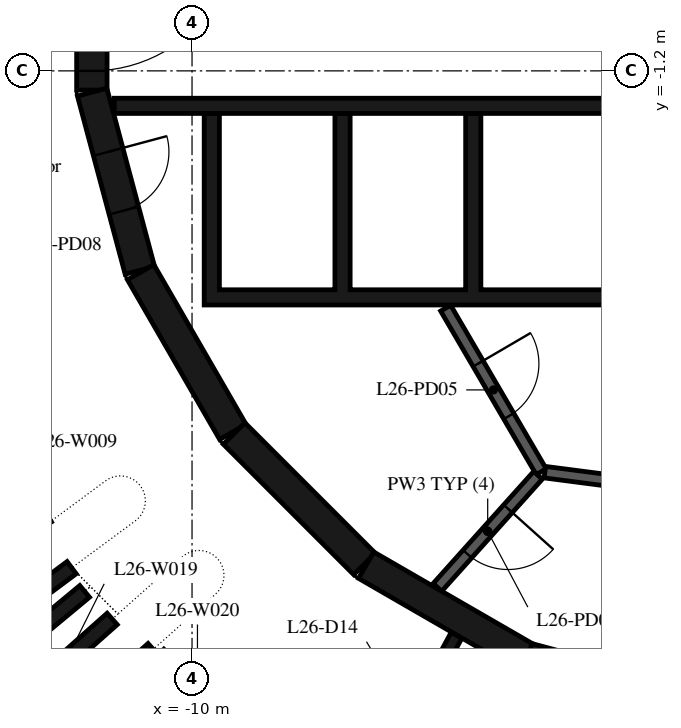
"""IFC4 building model, lengths in metres.
Left out: names, types, materials, properties, quantities, classifications, styles, units other than length and angle.
Written with IfcOpenShell. Run it as: python <this file> out.ifc"""

import sys

from ifc_helpers import new_model, si_unit, direction, frame, frame_2d, origin, place, context, subcontext, project, spatial, polyline, rectangle, outline, extrude, element, fill, save


model = new_model("IFC4")
c1 = context("Model", 3, precision=1e-05, world=origin(), true_north=direction((0.0, 1.0)))
c2 = subcontext(c1, "Body", "Model", "MODEL_VIEW")
j1 = project(units=[si_unit("LENGTHUNIT", "METRE"), si_unit("PLANEANGLEUNIT", "RADIAN")], contexts=[c1])
p1 = place(None, origin())
s1 = spatial("IfcSite", under=j1, at=p1, CompositionType="ELEMENT")
p2 = place(p1, origin())
s2 = spatial("IfcBuilding", under=s1, at=p2, CompositionType="ELEMENT")
p3 = place(p2, frame((0.0, 0.0, 108.2)))
s3 = spatial("IfcBuildingStorey", under=s2, at=p3, CompositionType="ELEMENT", Elevation=108.2)
p4 = place(p3, frame((-11.647, 1.516, 0.0), z_axis=(0.0, 0.0, 1.0), x_axis=(0.0, -1.0, 0.0)))
e1 = element("IfcWall", 1, at=p4, inside=s3, PredefinedType="SHEAR", context=c2, shape_type="SweptSolid", body=[
    extrude(rectangle(XDim=3.033, YDim=0.5, at=frame_2d((1.516, 0.0))), origin(), (0.0, 0.0, 1.0), 4.75),
])
p5 = place(p4, frame((0.316, 0.0, 0.0)))
e2 = element("IfcOpeningElement", 2, at=p5, cuts=e1, PredefinedType="OPENING", context=c2, shape_type="SweptSolid", body=[
    extrude(rectangle(XDim=2.4, YDim=2.1, at=frame_2d((1.2, 1.05))), frame((0.0, 0.26, 0.0), z_axis=(0.0, -1.0, 0.0), x_axis=(1.0, 0.0, 0.0)), (0.0, 0.0, 1.0), 0.52),
])
p6 = place(p3, frame((-11.643, -1.55, 0.0), z_axis=(0.0, 0.0, 1.0), x_axis=(0.258734743916, -0.965948410781, 0.0)))
e3 = element("IfcWall", 3, at=p6, inside=s3, PredefinedType="SHEAR", context=c2, shape_type="SweptSolid", body=[
    extrude(rectangle(XDim=3.033, YDim=0.5, at=frame_2d((1.516, 0.0))), origin(), (0.0, 0.0, 1.0), 4.75),
])
p7 = place(p6, frame((1.016, 0.0, 0.0)))
e4 = element("IfcOpeningElement", 4, at=p7, cuts=e3, PredefinedType="OPENING", context=c2, shape_type="SweptSolid", body=[
    extrude(rectangle(XDim=1.0, YDim=2.4, at=frame_2d((0.5, 1.2))), frame((0.0, 0.26, 0.0), z_axis=(0.0, -1.0, 0.0), x_axis=(1.0, 0.0, 0.0)), (0.0, 0.0, 1.0), 0.52),
])
p8 = place(p3, frame((-10.845, -4.51, 0.0), z_axis=(0.0, 0.0, 1.0), x_axis=(0.500087131594, -0.865975092491, 0.0)))
e5 = element("IfcWall", 5, at=p8, inside=s3, PredefinedType="SHEAR", context=c2, shape_type="SweptSolid", body=[
    extrude(rectangle(XDim=3.033, YDim=0.5, at=frame_2d((1.516, 0.0))), origin(), (0.0, 0.0, 1.0), 4.75),
])
p9 = place(p3, frame((-9.308, -7.164, 0.0), z_axis=(0.0, 0.0, 1.0), x_axis=(0.707106781187, -0.707106781187, 0.0)))
e6 = element("IfcWall", 6, at=p9, inside=s3, PredefinedType="SHEAR", context=c2, shape_type="SweptSolid", body=[
    extrude(rectangle(XDim=3.032, YDim=0.5, at=frame_2d((1.516, 0.0))), origin(), (0.0, 0.0, 1.0), 4.75),
])
for number, where, z_axis, x_axis in (
    (7, (-7.137, -9.329, 0.0), (0.0, 0.0, 1.0), (0.866, -0.5, 0.0)),
    (8, (-4.479, -10.858, 0.0), (0.0, 0.0, 1.0), (0.966, -0.259, 0.0)),
):
    element("IfcWall", number, at=place(p3, frame(where, z_axis=z_axis, x_axis=x_axis)), inside=s3, PredefinedType="SHEAR", context=c2, shape_type="SweptSolid", body=[
        extrude(rectangle(XDim=3.033, YDim=0.5, at=frame_2d((1.516, 0.0))), origin(), (0.0, 0.0, 1.0), 4.75),
    ])
p10 = place(p3, origin())
e9 = element("IfcWall", 9, at=p10, inside=s3, PredefinedType="SHEAR", context=c2, shape_type="SweptSolid", body=[
    extrude(outline(polyline([(9.8, -5.05), (9.8, -4.8), (9.8, -1.9), (9.55, -1.9), (9.55, -4.8), (7.65, -4.8), (7.65, -1.9), (7.4, -1.9), (7.4, -4.8), (5.5, -4.8), (5.5, -1.9), (5.25, -1.9), (5.25, -4.8), (3.35, -4.8), (3.35, -1.9), (3.1, -1.9), (3.1, -4.8), (-5.25, -4.8), (-5.25, -1.9), (-5.5, -1.9), (-5.5, -4.8), (-7.4, -4.8), (-7.4, -1.9), (-7.65, -1.9), (-7.65, -4.8), (-9.55, -4.8), (-9.55, -1.9), (-9.8, -1.9), (-9.8, -4.8), (-9.8, -5.05), (9.8, -5.05)])), origin(), (0.0, 0.0, 1.0), 4.75),
])
p11 = place(p3, frame((-11.28, -1.775, 0.0), z_axis=(0.0, 0.0, 1.0), x_axis=(1.0, 0.0, 0.0)))
e10 = element("IfcWall", 10, at=p11, inside=s3, PredefinedType="SHEAR", context=c2, shape_type="SweptSolid", body=[
    extrude(rectangle(XDim=14.38, YDim=0.25, at=frame_2d((7.19, 0.0))), origin(), (0.0, 0.0, 1.0), 4.75),
])
p12 = place(p11, frame((9.705, 0.0, 0.0)))
e11 = element("IfcOpeningElement", 11, at=p12, cuts=e10, PredefinedType="OPENING", context=c2, shape_type="SweptSolid", body=[
    extrude(rectangle(XDim=1.0, YDim=2.4, at=frame_2d((0.5, 1.2))), frame((0.0, 0.135, 0.0), z_axis=(0.0, -1.0, 0.0), x_axis=(1.0, 0.0, 0.0)), (0.0, 0.0, 1.0), 0.27),
])
p13 = place(p3, frame((-5.829, -5.102, 0.0), z_axis=(0.0, 0.0, 1.0), x_axis=(0.504480008384, -0.863423373057, 0.0)))
e12 = element("IfcWall", 12, at=p13, inside=s3, PredefinedType="PARTITIONING", context=c2, shape_type="SweptSolid", body=[
    extrude(rectangle(XDim=3.115, YDim=0.19, at=frame_2d((1.558, 0.0))), origin(), (0.0, 0.0, 1.0), 4.75),
])
p14 = place(p13, frame((1.058, 0.0, 0.0)))
e13 = element("IfcOpeningElement", 13, at=p14, cuts=e12, PredefinedType="OPENING", context=c2, shape_type="SweptSolid", body=[
    extrude(rectangle(XDim=1.0, YDim=2.4, at=frame_2d((0.5, 1.2))), frame((0.0, 0.105, 0.0), z_axis=(0.0, -1.0, 0.0), x_axis=(1.0, 0.0, 0.0)), (0.0, 0.0, 1.0), 0.21),
])
p15 = place(p3, frame((-4.311, -7.851, 0.0), z_axis=(0.0, 0.0, 1.0), x_axis=(-0.667869133096, -0.744278725383, 0.0)))
e14 = element("IfcWall", 14, at=p15, inside=s3, PredefinedType="PARTITIONING", context=c2, shape_type="SweptSolid", body=[
    extrude(rectangle(XDim=2.476, YDim=0.19, at=frame_2d((1.238, 0.0))), origin(), (0.0, 0.0, 1.0), 4.75),
])
p16 = place(p15, frame((0.738, 0.0, 0.0)))
e15 = element("IfcOpeningElement", 15, at=p16, cuts=e14, PredefinedType="OPENING", context=c2, shape_type="SweptSolid", body=[
    extrude(rectangle(XDim=1.0, YDim=2.4, at=frame_2d((0.5, 1.2))), frame((0.0, 0.105, 0.0), z_axis=(0.0, -1.0, 0.0), x_axis=(1.0, 0.0, 0.0)), (0.0, 0.0, 1.0), 0.21),
])
p17 = place(p3, frame((-4.198, -7.799, 0.0), z_axis=(0.0, 0.0, 1.0), x_axis=(0.991686747293, -0.128675542523, 0.0)))
e16 = element("IfcWall", 16, at=p17, inside=s3, PredefinedType="PARTITIONING", context=c2, shape_type="SweptSolid", body=[
    extrude(rectangle(XDim=1.793, YDim=0.19, at=frame_2d((0.896, 0.0))), origin(), (0.0, 0.0, 1.0), 4.75),
])
p18 = place(p3, frame((-13.98, -10.86, 0.0), z_axis=(0.0, 0.0, 1.0), x_axis=(0.80192236943, 0.597428249589, 0.0)))
e17 = element("IfcWall", 17, at=p18, inside=s3, PredefinedType="PARTITIONING", context=c2, shape_type="SweptSolid", body=[
    extrude(rectangle(XDim=2.494, YDim=0.25, at=frame_2d((1.247, 0.0))), origin(), (0.0, 0.0, 1.0), 4.75),
])
p19 = place(p3, frame((-12.28, -12.17, 0.0), z_axis=(0.0, 0.0, 1.0), x_axis=(0.746942923143, 0.664888163202, 0.0)))
e18 = element("IfcWall", 18, at=p19, inside=s3, PredefinedType="PARTITIONING", context=c2, shape_type="SweptSolid", body=[
    extrude(rectangle(XDim=2.196, YDim=0.25, at=frame_2d((1.098, 0.0))), origin(), (0.0, 0.0, 1.0), 4.75),
])
p20 = place(p3, frame((-11.766, -9.76, 0.0), z_axis=(0.0, 0.0, 1.0), x_axis=(-0.769226522348, -0.63897617899, 0.0)))
e19 = element("IfcWall", 19, at=p20, inside=s3, PredefinedType="PARTITIONING", context=c2, shape_type="SweptSolid", body=[
    extrude(rectangle(XDim=6.026, YDim=0.25, at=frame_2d((3.013, 0.0))), origin(), (0.0, 0.0, 1.0), 4.75),
])
p21 = place(p3, frame((-11.313, -10.213, 0.0), z_axis=(0.0, 0.0, 1.0), x_axis=(-0.747910613197, -0.663799453651, 0.0)))
e20 = element("IfcWall", 20, at=p21, inside=s3, PredefinedType="PARTITIONING", context=c2, shape_type="SweptSolid", body=[
    extrude(rectangle(XDim=2.014, YDim=0.25, at=frame_2d((1.007, 0.0))), origin(), (0.0, 0.0, 1.0), 4.75),
])
p22 = place(p3, frame((-7.109, -13.186, 0.0), z_axis=(0.0, 0.0, 1.0), x_axis=(0.474511788195, 0.880249148176, 0.0)))
e21 = element("IfcWall", 21, at=p22, inside=s3, PredefinedType="PARTITIONING", context=c2, shape_type="SweptSolid", body=[
    extrude(rectangle(XDim=3.074, YDim=0.2, at=frame_2d((1.537, 0.0))), origin(), (0.0, 0.0, 1.0), 4.75),
])
p23 = place(p22, frame((0.937, 0.0, 0.0)))
e22 = element("IfcOpeningElement", 22, at=p23, cuts=e21, PredefinedType="OPENING", context=c2, shape_type="SweptSolid", body=[
    extrude(rectangle(XDim=1.2, YDim=2.1, at=frame_2d((0.6, 1.05))), frame((0.0, 0.11, 0.0), z_axis=(0.0, -1.0, 0.0), x_axis=(1.0, 0.0, 0.0)), (0.0, 0.0, 1.0), 0.22),
])
p24 = place(p5, origin())
e23 = element("IfcDoor", 23, at=p24, inside=s3, OperationType="DOUBLE_DOOR_SINGLE_SWING", PredefinedType="DOOR", context=c2, shape_type="SweptSolid", body=[
    extrude(rectangle(XDim=2.4, YDim=2.1, at=frame_2d((1.2, 1.05))), frame((0.0, 0.025, 0.0), z_axis=(0.0, -1.0, 0.0), x_axis=(1.0, 0.0, 0.0)), (0.0, 0.0, 1.0), 0.05),
])
fill(e2, e23)
p25 = place(p16, origin())
e24 = element("IfcDoor", 24, at=p25, inside=s3, OperationType="SINGLE_SWING_LEFT", PredefinedType="DOOR", context=c2, shape_type="SweptSolid", body=[
    extrude(rectangle(XDim=1.0, YDim=2.4, at=frame_2d((0.5, 1.2))), frame((0.0, 0.025, 0.0), z_axis=(0.0, -1.0, 0.0), x_axis=(1.0, 0.0, 0.0)), (0.0, 0.0, 1.0), 0.05),
])
fill(e15, e24)
p26 = place(p14, origin())
e25 = element("IfcDoor", 25, at=p26, inside=s3, OperationType="SINGLE_SWING_RIGHT", PredefinedType="DOOR", context=c2, shape_type="SweptSolid", body=[
    extrude(rectangle(XDim=1.0, YDim=2.4, at=frame_2d((0.5, 1.2))), frame((0.0, 0.025, 0.0), z_axis=(0.0, -1.0, 0.0), x_axis=(1.0, 0.0, 0.0)), (0.0, 0.0, 1.0), 0.05),
])
fill(e13, e25)
p27 = place(p7, origin())
e26 = element("IfcDoor", 26, at=p27, inside=s3, OperationType="SINGLE_SWING_LEFT", PredefinedType="DOOR", context=c2, shape_type="SweptSolid", body=[
    extrude(rectangle(XDim=1.0, YDim=2.4, at=frame_2d((0.5, 1.2))), frame((0.0, 0.025, 0.0), z_axis=(0.0, -1.0, 0.0), x_axis=(1.0, 0.0, 0.0)), (0.0, 0.0, 1.0), 0.05),
])
fill(e4, e26)
save(model, sys.argv[1])
